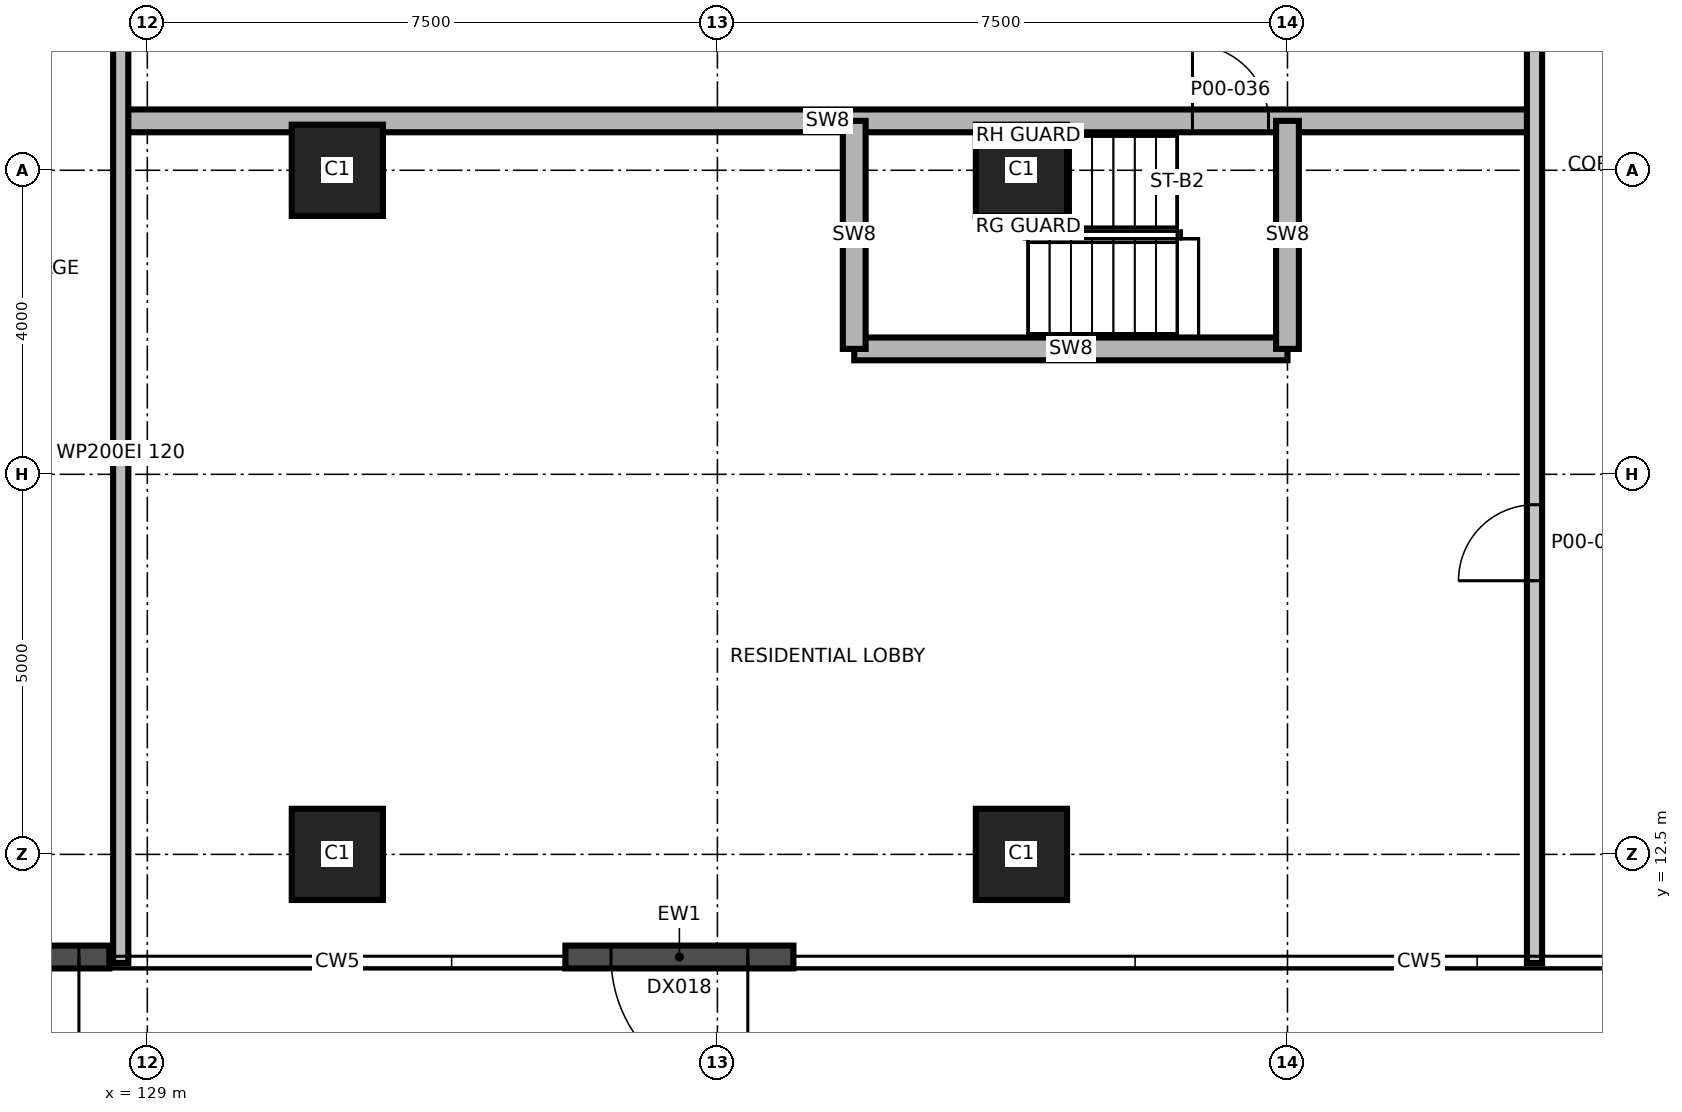
"""IFC4 building model, lengths in metres.
Left out: names, types, materials, properties, quantities, classifications, styles, units other than length and angle.
Written with IfcOpenShell. Run it as: python <this file> out.ifc"""

import sys

from ifc_helpers import new_model, si_unit, direction, frame, frame_2d, origin, origin_2d, place, context, subcontext, project, spatial, rectangle, extrude, element, fill, save


model = new_model("IFC4")
c1 = context("Model", 3, precision=1e-05, world=origin(), true_north=direction((0.0, 1.0)))
c2 = subcontext(c1, "Body", "Model", "MODEL_VIEW")
j1 = project(units=[si_unit("LENGTHUNIT", "METRE"), si_unit("PLANEANGLEUNIT", "RADIAN")], contexts=[c1])
p1 = place(None, origin())
s1 = spatial("IfcSite", under=j1, at=p1, CompositionType="ELEMENT")
p2 = place(p1, origin())
s2 = spatial("IfcBuilding", under=s1, at=p2, CompositionType="ELEMENT")
p3 = place(p2, origin())
s3 = spatial("IfcBuildingStorey", under=s2, at=p3, CompositionType="ELEMENT", Elevation=0.0)
for number, where, z_axis, x_axis in (
    (1, (131.5, 12.5, 0.0), (0.0, 0.0, 1.0), (1.0, 0.0, 0.0)),
    (2, (140.5, 12.5, 0.0), (0.0, 0.0, 1.0), (1.0, 0.0, 0.0)),
    (3, (131.5, 21.5, 0.0), (0.0, 0.0, 1.0), (1.0, 0.0, 0.0)),
    (4, (140.5, 21.5, 0.0), (0.0, 0.0, 1.0), (1.0, 0.0, 0.0)),
):
    element("IfcColumn", number, at=place(p3, frame(where, z_axis=z_axis, x_axis=x_axis)), inside=s3, PredefinedType="COLUMN", context=c2, shape_type="SweptSolid", body=[
        extrude(rectangle(XDim=1.2, YDim=1.2, at=origin_2d()), origin(), (0.0, 0.0, 1.0), 8.0),
    ])
p4 = place(p3, frame((128.5, 11.15, 0.0), z_axis=(0.0, 0.0, 1.0), x_axis=(-1.0, 0.0, 0.0)))
e5 = element("IfcWall", 5, at=p4, inside=s3, PredefinedType="SOLIDWALL", context=c2, shape_type="SweptSolid", body=[
    extrude(rectangle(XDim=2.6, YDim=0.3, at=frame_2d((1.3, 0.0))), origin(), (0.0, 0.0, 1.0), 7.7),
])
p5 = place(p4, frame((0.4, 0.0, 0.0)))
e6 = element("IfcOpeningElement", 6, at=p5, cuts=e5, PredefinedType="OPENING", context=c2, shape_type="SweptSolid", body=[
    extrude(rectangle(XDim=1.8, YDim=2.4, at=frame_2d((0.9, 1.2))), frame((0.0, 0.16, 0.0), z_axis=(0.0, -1.0, 0.0), x_axis=(1.0, 0.0, 0.0)), (0.0, 0.0, 1.0), 0.32),
])
p6 = place(p3, frame((137.5, 11.15, 0.0), z_axis=(0.0, 0.0, 1.0), x_axis=(-1.0, 0.0, 0.0)))
e7 = element("IfcWall", 7, at=p6, inside=s3, PredefinedType="SOLIDWALL", context=c2, shape_type="SweptSolid", body=[
    extrude(rectangle(XDim=3.0, YDim=0.3, at=frame_2d((1.5, 0.0))), origin(), (0.0, 0.0, 1.0), 7.7),
])
p7 = place(p6, frame((0.6, 0.0, 0.0)))
e8 = element("IfcOpeningElement", 8, at=p7, cuts=e7, PredefinedType="OPENING", context=c2, shape_type="SweptSolid", body=[
    extrude(rectangle(XDim=1.8, YDim=2.4, at=frame_2d((0.9, 1.2))), frame((0.0, 0.16, 0.0), z_axis=(0.0, -1.0, 0.0), x_axis=(1.0, 0.0, 0.0)), (0.0, 0.0, 1.0), 0.32),
])
p8 = place(p3, frame((138.3, 19.15, 0.0), z_axis=(0.0, 0.0, 1.0), x_axis=(1.0, 0.0, 0.0)))
e9 = element("IfcWall", 9, at=p8, inside=s3, PredefinedType="SHEAR", context=c2, shape_type="SweptSolid", body=[
    extrude(rectangle(XDim=5.7, YDim=0.3, at=frame_2d((2.85, 0.0))), origin(), (0.0, 0.0, 1.0), 7.7),
])
p9 = place(p3, frame((128.65, 22.15, 0.0), z_axis=(0.0, 0.0, 1.0), x_axis=(1.0, 0.0, 0.0)))
e10 = element("IfcWall", 10, at=p9, inside=s3, PredefinedType="SHEAR", context=c2, shape_type="SweptSolid", body=[
    extrude(rectangle(XDim=18.6, YDim=0.3, at=frame_2d((9.3, 0.0))), origin(), (0.0, 0.0, 1.0), 7.7),
])
p10 = place(p9, frame((14.1, 0.0, 0.0)))
e11 = element("IfcOpeningElement", 11, at=p10, cuts=e10, PredefinedType="OPENING", context=c2, shape_type="SweptSolid", body=[
    extrude(rectangle(XDim=1.0, YDim=2.1, at=frame_2d((0.5, 1.05))), frame((0.0, 0.16, 0.0), z_axis=(0.0, -1.0, 0.0), x_axis=(1.0, 0.0, 0.0)), (0.0, 0.0, 1.0), 0.32),
])
p11 = place(p3, frame((128.65, 11.07, 0.0), z_axis=(0.0, 0.0, 1.0), x_axis=(0.0, 1.0, 0.0)))
e12 = element("IfcWall", 12, at=p11, inside=s3, PredefinedType="PARTITIONING", context=c2, shape_type="SweptSolid", body=[
    extrude(rectangle(XDim=13.41, YDim=0.2, at=frame_2d((6.705, 0.0))), origin(), (0.0, 0.0, 1.0), 6.8),
])
for number, where, z_axis, x_axis in (
    (13, (138.3, 19.15, 0.0), (0.0, 0.0, 1.0), (0.0, 1.0, 0.0)),
    (14, (144.0, 19.15, 0.0), (0.0, 0.0, 1.0), (0.0, 1.0, 0.0)),
):
    element("IfcWall", number, at=place(p3, frame(where, z_axis=z_axis, x_axis=x_axis)), inside=s3, PredefinedType="SHEAR", context=c2, shape_type="SweptSolid", body=[
        extrude(rectangle(XDim=3.0, YDim=0.3, at=frame_2d((1.5, 0.0))), origin(), (0.0, 0.0, 1.0), 7.7),
    ])
p12 = place(p3, frame((147.25, 11.07, 0.0), z_axis=(0.0, 0.0, 1.0), x_axis=(0.0, 1.0, 0.0)))
e15 = element("IfcWall", 15, at=p12, inside=s3, PredefinedType="PARTITIONING", context=c2, shape_type="SweptSolid", body=[
    extrude(rectangle(XDim=38.86, YDim=0.2, at=frame_2d((19.43, 0.0))), origin(), (0.0, 0.0, 1.0), 6.8),
])
p13 = place(p12, frame((18.18, 0.0, 0.0)))
e16 = element("IfcOpeningElement", 16, at=p13, cuts=e15, PredefinedType="OPENING", context=c2, shape_type="SweptSolid", body=[
    extrude(rectangle(XDim=1.5, YDim=2.1, at=frame_2d((0.75, 1.05))), frame((0.0, 0.11, 0.0), z_axis=(0.0, -1.0, 0.0), x_axis=(1.0, 0.0, 0.0)), (0.0, 0.0, 1.0), 0.22),
])
p14 = place(p12, frame((5.03, 0.0, 0.0)))
e17 = element("IfcOpeningElement", 17, at=p14, cuts=e15, PredefinedType="OPENING", context=c2, shape_type="SweptSolid", body=[
    extrude(rectangle(XDim=1.0, YDim=2.1, at=frame_2d((0.5, 1.05))), frame((0.0, 0.11, 0.0), z_axis=(0.0, -1.0, 0.0), x_axis=(1.0, 0.0, 0.0)), (0.0, 0.0, 1.0), 0.22),
])
p15 = place(p5, origin())
e18 = element("IfcDoor", 18, at=p15, inside=s3, OperationType="SINGLE_SWING_LEFT", PredefinedType="DOOR", context=c2, shape_type="SweptSolid", body=[
    extrude(rectangle(XDim=1.8, YDim=2.4, at=frame_2d((0.9, 1.2))), frame((0.0, 0.025, 0.0), z_axis=(0.0, -1.0, 0.0), x_axis=(1.0, 0.0, 0.0)), (0.0, 0.0, 1.0), 0.05),
])
fill(e6, e18)
p16 = place(p7, origin())
e19 = element("IfcDoor", 19, at=p16, inside=s3, OperationType="SINGLE_SWING_LEFT", PredefinedType="DOOR", context=c2, shape_type="SweptSolid", body=[
    extrude(rectangle(XDim=1.8, YDim=2.4, at=frame_2d((0.9, 1.2))), frame((0.0, 0.025, 0.0), z_axis=(0.0, -1.0, 0.0), x_axis=(1.0, 0.0, 0.0)), (0.0, 0.0, 1.0), 0.05),
])
fill(e8, e19)
p17 = place(p10, origin())
e20 = element("IfcDoor", 20, at=p17, inside=s3, OperationType="SINGLE_SWING_RIGHT", PredefinedType="DOOR", context=c2, shape_type="SweptSolid", body=[
    extrude(rectangle(XDim=1.0, YDim=2.1, at=frame_2d((0.5, 1.05))), frame((0.0, 0.025, 0.0), z_axis=(0.0, -1.0, 0.0), x_axis=(1.0, 0.0, 0.0)), (0.0, 0.0, 1.0), 0.05),
])
fill(e11, e20)
p18 = place(p14, origin())
e21 = element("IfcDoor", 21, at=p18, inside=s3, OperationType="SINGLE_SWING_LEFT", PredefinedType="DOOR", context=c2, shape_type="SweptSolid", body=[
    extrude(rectangle(XDim=1.0, YDim=2.1, at=frame_2d((0.5, 1.05))), frame((0.0, 0.025, 0.0), z_axis=(0.0, -1.0, 0.0), x_axis=(1.0, 0.0, 0.0)), (0.0, 0.0, 1.0), 0.05),
])
fill(e17, e21)
save(model, sys.argv[1])
